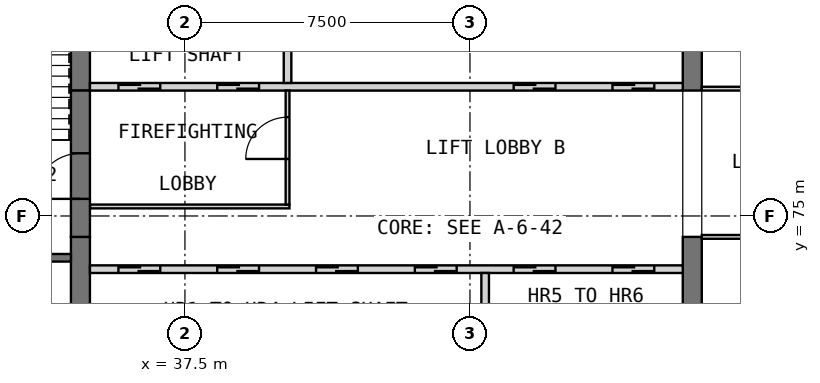
"""IFC4 building model, lengths in metres.
Left out: names, types, materials, properties, quantities, classifications, styles, units other than length and angle.
Written with IfcOpenShell. Run it as: python <this file> out.ifc"""

import sys

from ifc_helpers import new_model, si_unit, direction, frame, frame_2d, origin, place, context, subcontext, project, spatial, rectangle, extrude, element, fill, save


model = new_model("IFC4")
c1 = context("Model", 3, precision=1e-05, world=origin(), true_north=direction((0.0, 1.0)))
c2 = subcontext(c1, "Body", "Model", "MODEL_VIEW")
j1 = project(units=[si_unit("LENGTHUNIT", "METRE"), si_unit("PLANEANGLEUNIT", "RADIAN")], contexts=[c1])
p1 = place(None, origin())
s1 = spatial("IfcSite", under=j1, at=p1, CompositionType="ELEMENT")
p2 = place(p1, origin())
s2 = spatial("IfcBuilding", under=s1, at=p2, CompositionType="ELEMENT")
p3 = place(p2, frame((0.0, 0.0, 276.7)))
s3 = spatial("IfcBuildingStorey", under=s2, at=p3, CompositionType="ELEMENT", Elevation=276.7)
p4 = place(p3, frame((34.75, 68.05, 0.0), z_axis=(0.0, 0.0, 1.0), x_axis=(0.0, 1.0, 0.0)))
e1 = element("IfcWall", 1, at=p4, inside=s3, PredefinedType="SHEAR", context=c2, shape_type="SweptSolid", body=[
    extrude(rectangle(XDim=6.4, YDim=0.5, at=frame_2d((3.2, 0.0))), origin(), (0.0, 0.0, 1.0), 3.5),
])
p5 = place(p3, frame((34.75, 78.3, 0.0), z_axis=(0.0, 0.0, 1.0), x_axis=(0.0, 1.0, 0.0)))
e2 = element("IfcWall", 2, at=p5, inside=s3, PredefinedType="SHEAR", context=c2, shape_type="SweptSolid", body=[
    extrude(rectangle(XDim=3.6, YDim=0.5, at=frame_2d((1.8, 0.0))), origin(), (0.0, 0.0, 1.0), 3.5),
])
p6 = place(p3, frame((50.85, 68.05, 0.0), z_axis=(0.0, 0.0, 1.0), x_axis=(0.0, 1.0, 0.0)))
e3 = element("IfcWall", 3, at=p6, inside=s3, PredefinedType="SHEAR", context=c2, shape_type="SweptSolid", body=[
    extrude(rectangle(XDim=6.4, YDim=0.5, at=frame_2d((3.2, 0.0))), origin(), (0.0, 0.0, 1.0), 3.5),
])
p7 = place(p3, frame((50.85, 78.3, 0.0), z_axis=(0.0, 0.0, 1.0), x_axis=(0.0, 1.0, 0.0)))
e4 = element("IfcWall", 4, at=p7, inside=s3, PredefinedType="SHEAR", context=c2, shape_type="SweptSolid", body=[
    extrude(rectangle(XDim=3.6, YDim=0.5, at=frame_2d((1.8, 0.0))), origin(), (0.0, 0.0, 1.0), 3.5),
])
p8 = place(p3, frame((35.0, 73.6, 0.0), z_axis=(0.0, 0.0, 1.0), x_axis=(1.0, 0.0, 0.0)))
e5 = element("IfcWall", 5, at=p8, inside=s3, PredefinedType="SOLIDWALL", context=c2, shape_type="SweptSolid", body=[
    extrude(rectangle(XDim=15.6, YDim=0.2, at=frame_2d((7.8, 0.0))), origin(), (0.0, 0.0, 1.0), 3.5),
])
p9 = place(p8, frame((0.75, 0.0, 0.0)))
e6 = element("IfcOpeningElement", 6, at=p9, cuts=e5, PredefinedType="OPENING", context=c2, shape_type="SweptSolid", body=[
    extrude(rectangle(XDim=1.1, YDim=2.1, at=frame_2d((0.55, 1.05))), frame((0.0, 0.11, 0.0), z_axis=(0.0, -1.0, 0.0), x_axis=(1.0, 0.0, 0.0)), (0.0, 0.0, 1.0), 0.22),
])
p10 = place(p8, frame((3.35, 0.0, 0.0)))
e7 = element("IfcOpeningElement", 7, at=p10, cuts=e5, PredefinedType="OPENING", context=c2, shape_type="SweptSolid", body=[
    extrude(rectangle(XDim=1.1, YDim=2.1, at=frame_2d((0.55, 1.05))), frame((0.0, 0.11, 0.0), z_axis=(0.0, -1.0, 0.0), x_axis=(1.0, 0.0, 0.0)), (0.0, 0.0, 1.0), 0.22),
])
p11 = place(p8, frame((5.95, 0.0, 0.0)))
e8 = element("IfcOpeningElement", 8, at=p11, cuts=e5, PredefinedType="OPENING", context=c2, shape_type="SweptSolid", body=[
    extrude(rectangle(XDim=1.1, YDim=2.1, at=frame_2d((0.55, 1.05))), frame((0.0, 0.11, 0.0), z_axis=(0.0, -1.0, 0.0), x_axis=(1.0, 0.0, 0.0)), (0.0, 0.0, 1.0), 0.22),
])
p12 = place(p8, frame((8.55, 0.0, 0.0)))
e9 = element("IfcOpeningElement", 9, at=p12, cuts=e5, PredefinedType="OPENING", context=c2, shape_type="SweptSolid", body=[
    extrude(rectangle(XDim=1.1, YDim=2.1, at=frame_2d((0.55, 1.05))), frame((0.0, 0.11, 0.0), z_axis=(0.0, -1.0, 0.0), x_axis=(1.0, 0.0, 0.0)), (0.0, 0.0, 1.0), 0.22),
])
p13 = place(p8, frame((11.15, 0.0, 0.0)))
e10 = element("IfcOpeningElement", 10, at=p13, cuts=e5, PredefinedType="OPENING", context=c2, shape_type="SweptSolid", body=[
    extrude(rectangle(XDim=1.1, YDim=2.1, at=frame_2d((0.55, 1.05))), frame((0.0, 0.11, 0.0), z_axis=(0.0, -1.0, 0.0), x_axis=(1.0, 0.0, 0.0)), (0.0, 0.0, 1.0), 0.22),
])
p14 = place(p8, frame((13.75, 0.0, 0.0)))
e11 = element("IfcOpeningElement", 11, at=p14, cuts=e5, PredefinedType="OPENING", context=c2, shape_type="SweptSolid", body=[
    extrude(rectangle(XDim=1.1, YDim=2.1, at=frame_2d((0.55, 1.05))), frame((0.0, 0.11, 0.0), z_axis=(0.0, -1.0, 0.0), x_axis=(1.0, 0.0, 0.0)), (0.0, 0.0, 1.0), 0.22),
])
p15 = place(p3, frame((45.4, 71.5, 0.0), z_axis=(0.0, 0.0, 1.0), x_axis=(0.0, 1.0, 0.0)))
e12 = element("IfcWall", 12, at=p15, inside=s3, PredefinedType="SOLIDWALL", context=c2, shape_type="SweptSolid", body=[
    extrude(rectangle(XDim=2.0, YDim=0.2, at=frame_2d((1.0, 0.0))), origin(), (0.0, 0.0, 1.0), 3.5),
])
p16 = place(p3, frame((35.0, 78.4, 0.0), z_axis=(0.0, 0.0, 1.0), x_axis=(1.0, 0.0, 0.0)))
e13 = element("IfcWall", 13, at=p16, inside=s3, PredefinedType="SOLIDWALL", context=c2, shape_type="SweptSolid", body=[
    extrude(rectangle(XDim=15.6, YDim=0.2, at=frame_2d((7.8, 0.0))), origin(), (0.0, 0.0, 1.0), 3.5),
])
p17 = place(p16, frame((0.75, 0.0, 0.0)))
e14 = element("IfcOpeningElement", 14, at=p17, cuts=e13, PredefinedType="OPENING", context=c2, shape_type="SweptSolid", body=[
    extrude(rectangle(XDim=1.1, YDim=2.1, at=frame_2d((0.55, 1.05))), frame((0.0, 0.11, 0.0), z_axis=(0.0, -1.0, 0.0), x_axis=(1.0, 0.0, 0.0)), (0.0, 0.0, 1.0), 0.22),
])
p18 = place(p16, frame((3.35, 0.0, 0.0)))
e15 = element("IfcOpeningElement", 15, at=p18, cuts=e13, PredefinedType="OPENING", context=c2, shape_type="SweptSolid", body=[
    extrude(rectangle(XDim=1.1, YDim=2.1, at=frame_2d((0.55, 1.05))), frame((0.0, 0.11, 0.0), z_axis=(0.0, -1.0, 0.0), x_axis=(1.0, 0.0, 0.0)), (0.0, 0.0, 1.0), 0.22),
])
p19 = place(p16, frame((11.15, 0.0, 0.0)))
e16 = element("IfcOpeningElement", 16, at=p19, cuts=e13, PredefinedType="OPENING", context=c2, shape_type="SweptSolid", body=[
    extrude(rectangle(XDim=1.1, YDim=2.1, at=frame_2d((0.55, 1.05))), frame((0.0, 0.11, 0.0), z_axis=(0.0, -1.0, 0.0), x_axis=(1.0, 0.0, 0.0)), (0.0, 0.0, 1.0), 0.22),
])
p20 = place(p16, frame((13.75, 0.0, 0.0)))
e17 = element("IfcOpeningElement", 17, at=p20, cuts=e13, PredefinedType="OPENING", context=c2, shape_type="SweptSolid", body=[
    extrude(rectangle(XDim=1.1, YDim=2.1, at=frame_2d((0.55, 1.05))), frame((0.0, 0.11, 0.0), z_axis=(0.0, -1.0, 0.0), x_axis=(1.0, 0.0, 0.0)), (0.0, 0.0, 1.0), 0.22),
])
p21 = place(p3, frame((40.2, 78.5, 0.0), z_axis=(0.0, 0.0, 1.0), x_axis=(0.0, 1.0, 0.0)))
e18 = element("IfcWall", 18, at=p21, inside=s3, PredefinedType="SOLIDWALL", context=c2, shape_type="SweptSolid", body=[
    extrude(rectangle(XDim=3.4, YDim=0.2, at=frame_2d((1.7, 0.0))), origin(), (0.0, 0.0, 1.0), 3.5),
])
p22 = place(p3, frame((35.0, 75.25, 0.0), z_axis=(0.0, 0.0, 1.0), x_axis=(1.0, 0.0, 0.0)))
e19 = element("IfcWall", 19, at=p22, inside=s3, PredefinedType="PARTITIONING", context=c2, shape_type="SweptSolid", body=[
    extrude(rectangle(XDim=5.25, YDim=0.1, at=frame_2d((2.625, 0.0))), origin(), (0.0, 0.0, 1.0), 3.25),
])
p23 = place(p3, frame((40.2, 75.3, 0.0), z_axis=(0.0, 0.0, 1.0), x_axis=(0.0, 1.0, 0.0)))
e20 = element("IfcWall", 20, at=p23, inside=s3, PredefinedType="PARTITIONING", context=c2, shape_type="SweptSolid", body=[
    extrude(rectangle(XDim=3.0, YDim=0.1, at=frame_2d((1.5, 0.0))), origin(), (0.0, 0.0, 1.0), 3.25),
])
p24 = place(p23, frame((1.2, 0.0, 0.0)))
e21 = element("IfcOpeningElement", 21, at=p24, cuts=e20, PredefinedType="OPENING", context=c2, shape_type="SweptSolid", body=[
    extrude(rectangle(XDim=1.1, YDim=2.1, at=frame_2d((0.55, 1.05))), frame((0.0, 0.06, 0.0), z_axis=(0.0, -1.0, 0.0), x_axis=(1.0, 0.0, 0.0)), (0.0, 0.0, 1.0), 0.12),
])
p25 = place(p3, frame((34.75, 74.45, 0.0), z_axis=(0.0, 0.0, 1.0), x_axis=(0.0, 1.0, 0.0)))
e22 = element("IfcWall", 22, at=p25, inside=s3, PredefinedType="SOLIDWALL", context=c2, shape_type="SweptSolid", body=[
    extrude(rectangle(XDim=3.85, YDim=0.5, at=frame_2d((1.925, 0.0))), origin(), (0.0, 0.0, 1.0), 2.3),
])
p26 = place(p25, frame((1.0, 0.0, 0.0)))
e23 = element("IfcOpeningElement", 23, at=p26, cuts=e22, PredefinedType="OPENING", context=c2, shape_type="SweptSolid", body=[
    extrude(rectangle(XDim=1.2, YDim=2.1, at=frame_2d((0.6, 1.05))), frame((0.0, 0.26, 0.0), z_axis=(0.0, -1.0, 0.0), x_axis=(1.0, 0.0, 0.0)), (0.0, 0.0, 1.0), 0.52),
])
p27 = place(p3, frame((30.6, 73.9, 0.0), z_axis=(0.0, 0.0, 1.0), x_axis=(1.0, 0.0, 0.0)))
e24 = element("IfcWall", 24, at=p27, inside=s3, PredefinedType="SOLIDWALL", context=c2, shape_type="SweptSolid", body=[
    extrude(rectangle(XDim=3.9, YDim=0.2, at=frame_2d((1.95, 0.0))), origin(), (0.0, 0.0, 1.0), 3.25),
])
p28 = place(p27, frame((1.7, 0.0, 0.0)))
e25 = element("IfcOpeningElement", 25, at=p28, cuts=e24, PredefinedType="OPENING", context=c2, shape_type="SweptSolid", body=[
    extrude(rectangle(XDim=0.9, YDim=2.1, at=frame_2d((0.45, 1.05))), frame((0.0, 0.11, 0.0), z_axis=(0.0, -1.0, 0.0), x_axis=(1.0, 0.0, 0.0)), (0.0, 0.0, 1.0), 0.22),
])
p29 = place(p3, frame((51.1, 74.45, 0.0), z_axis=(0.0, 0.0, 1.0), x_axis=(1.0, 0.0, 0.0)))
e26 = element("IfcWall", 26, at=p29, inside=s3, PredefinedType="PARTITIONING", context=c2, shape_type="SweptSolid", body=[
    extrude(rectangle(XDim=8.3, YDim=0.1, at=frame_2d((4.15, 0.0))), origin(), (0.0, 0.0, 1.0), 3.25),
])
p30 = place(p29, frame((3.7, 0.0, 0.0)))
e27 = element("IfcOpeningElement", 27, at=p30, cuts=e26, PredefinedType="OPENING", context=c2, shape_type="SweptSolid", body=[
    extrude(rectangle(XDim=0.9, YDim=2.1, at=frame_2d((0.45, 1.05))), frame((0.0, 0.06, 0.0), z_axis=(0.0, -1.0, 0.0), x_axis=(1.0, 0.0, 0.0)), (0.0, 0.0, 1.0), 0.12),
])
p31 = place(p3, frame((51.1, 78.35, 0.0), z_axis=(0.0, 0.0, 1.0), x_axis=(1.0, 0.0, 0.0)))
e28 = element("IfcWall", 28, at=p31, inside=s3, PredefinedType="PARTITIONING", context=c2, shape_type="SweptSolid", body=[
    extrude(rectangle(XDim=8.3, YDim=0.1, at=frame_2d((4.15, 0.0))), origin(), (0.0, 0.0, 1.0), 3.25),
])
p32 = place(p31, frame((3.7, 0.0, 0.0)))
e29 = element("IfcOpeningElement", 29, at=p32, cuts=e28, PredefinedType="OPENING", context=c2, shape_type="SweptSolid", body=[
    extrude(rectangle(XDim=0.9, YDim=2.1, at=frame_2d((0.45, 1.05))), frame((0.0, 0.06, 0.0), z_axis=(0.0, -1.0, 0.0), x_axis=(1.0, 0.0, 0.0)), (0.0, 0.0, 1.0), 0.12),
])
p33 = place(p9, origin())
e30 = element("IfcDoor", 30, at=p33, inside=s3, OperationType="DOUBLE_DOOR_SLIDING", PredefinedType="DOOR", context=c2, shape_type="SweptSolid", body=[
    extrude(rectangle(XDim=1.1, YDim=2.1, at=frame_2d((0.55, 1.05))), frame((0.0, 0.025, 0.0), z_axis=(0.0, -1.0, 0.0), x_axis=(1.0, 0.0, 0.0)), (0.0, 0.0, 1.0), 0.05),
])
fill(e6, e30)
p34 = place(p10, origin())
e31 = element("IfcDoor", 31, at=p34, inside=s3, OperationType="DOUBLE_DOOR_SLIDING", PredefinedType="DOOR", context=c2, shape_type="SweptSolid", body=[
    extrude(rectangle(XDim=1.1, YDim=2.1, at=frame_2d((0.55, 1.05))), frame((0.0, 0.025, 0.0), z_axis=(0.0, -1.0, 0.0), x_axis=(1.0, 0.0, 0.0)), (0.0, 0.0, 1.0), 0.05),
])
fill(e7, e31)
p35 = place(p11, origin())
e32 = element("IfcDoor", 32, at=p35, inside=s3, OperationType="DOUBLE_DOOR_SLIDING", PredefinedType="DOOR", context=c2, shape_type="SweptSolid", body=[
    extrude(rectangle(XDim=1.1, YDim=2.1, at=frame_2d((0.55, 1.05))), frame((0.0, 0.025, 0.0), z_axis=(0.0, -1.0, 0.0), x_axis=(1.0, 0.0, 0.0)), (0.0, 0.0, 1.0), 0.05),
])
fill(e8, e32)
p36 = place(p12, origin())
e33 = element("IfcDoor", 33, at=p36, inside=s3, OperationType="DOUBLE_DOOR_SLIDING", PredefinedType="DOOR", context=c2, shape_type="SweptSolid", body=[
    extrude(rectangle(XDim=1.1, YDim=2.1, at=frame_2d((0.55, 1.05))), frame((0.0, 0.025, 0.0), z_axis=(0.0, -1.0, 0.0), x_axis=(1.0, 0.0, 0.0)), (0.0, 0.0, 1.0), 0.05),
])
fill(e9, e33)
p37 = place(p13, origin())
e34 = element("IfcDoor", 34, at=p37, inside=s3, OperationType="DOUBLE_DOOR_SLIDING", PredefinedType="DOOR", context=c2, shape_type="SweptSolid", body=[
    extrude(rectangle(XDim=1.1, YDim=2.1, at=frame_2d((0.55, 1.05))), frame((0.0, 0.025, 0.0), z_axis=(0.0, -1.0, 0.0), x_axis=(1.0, 0.0, 0.0)), (0.0, 0.0, 1.0), 0.05),
])
fill(e10, e34)
p38 = place(p14, origin())
e35 = element("IfcDoor", 35, at=p38, inside=s3, OperationType="DOUBLE_DOOR_SLIDING", PredefinedType="DOOR", context=c2, shape_type="SweptSolid", body=[
    extrude(rectangle(XDim=1.1, YDim=2.1, at=frame_2d((0.55, 1.05))), frame((0.0, 0.025, 0.0), z_axis=(0.0, -1.0, 0.0), x_axis=(1.0, 0.0, 0.0)), (0.0, 0.0, 1.0), 0.05),
])
fill(e11, e35)
p39 = place(p17, origin())
e36 = element("IfcDoor", 36, at=p39, inside=s3, OperationType="DOUBLE_DOOR_SLIDING", PredefinedType="DOOR", context=c2, shape_type="SweptSolid", body=[
    extrude(rectangle(XDim=1.1, YDim=2.1, at=frame_2d((0.55, 1.05))), frame((0.0, 0.025, 0.0), z_axis=(0.0, -1.0, 0.0), x_axis=(1.0, 0.0, 0.0)), (0.0, 0.0, 1.0), 0.05),
])
fill(e14, e36)
p40 = place(p18, origin())
e37 = element("IfcDoor", 37, at=p40, inside=s3, OperationType="DOUBLE_DOOR_SLIDING", PredefinedType="DOOR", context=c2, shape_type="SweptSolid", body=[
    extrude(rectangle(XDim=1.1, YDim=2.1, at=frame_2d((0.55, 1.05))), frame((0.0, 0.025, 0.0), z_axis=(0.0, -1.0, 0.0), x_axis=(1.0, 0.0, 0.0)), (0.0, 0.0, 1.0), 0.05),
])
fill(e15, e37)
p41 = place(p19, origin())
e38 = element("IfcDoor", 38, at=p41, inside=s3, OperationType="DOUBLE_DOOR_SLIDING", PredefinedType="DOOR", context=c2, shape_type="SweptSolid", body=[
    extrude(rectangle(XDim=1.1, YDim=2.1, at=frame_2d((0.55, 1.05))), frame((0.0, 0.025, 0.0), z_axis=(0.0, -1.0, 0.0), x_axis=(1.0, 0.0, 0.0)), (0.0, 0.0, 1.0), 0.05),
])
fill(e16, e38)
p42 = place(p20, origin())
e39 = element("IfcDoor", 39, at=p42, inside=s3, OperationType="DOUBLE_DOOR_SLIDING", PredefinedType="DOOR", context=c2, shape_type="SweptSolid", body=[
    extrude(rectangle(XDim=1.1, YDim=2.1, at=frame_2d((0.55, 1.05))), frame((0.0, 0.025, 0.0), z_axis=(0.0, -1.0, 0.0), x_axis=(1.0, 0.0, 0.0)), (0.0, 0.0, 1.0), 0.05),
])
fill(e17, e39)
p43 = place(p24, origin())
e40 = element("IfcDoor", 40, at=p43, inside=s3, OperationType="SINGLE_SWING_LEFT", PredefinedType="DOOR", context=c2, shape_type="SweptSolid", body=[
    extrude(rectangle(XDim=1.1, YDim=2.1, at=frame_2d((0.55, 1.05))), frame((0.0, 0.025, 0.0), z_axis=(0.0, -1.0, 0.0), x_axis=(1.0, 0.0, 0.0)), (0.0, 0.0, 1.0), 0.05),
])
fill(e21, e40)
p44 = place(p26, origin())
e41 = element("IfcDoor", 41, at=p44, inside=s3, OperationType="SINGLE_SWING_RIGHT", PredefinedType="DOOR", context=c2, shape_type="SweptSolid", body=[
    extrude(rectangle(XDim=1.2, YDim=2.1, at=frame_2d((0.6, 1.05))), frame((0.0, 0.025, 0.0), z_axis=(0.0, -1.0, 0.0), x_axis=(1.0, 0.0, 0.0)), (0.0, 0.0, 1.0), 0.05),
])
fill(e23, e41)
save(model, sys.argv[1])
